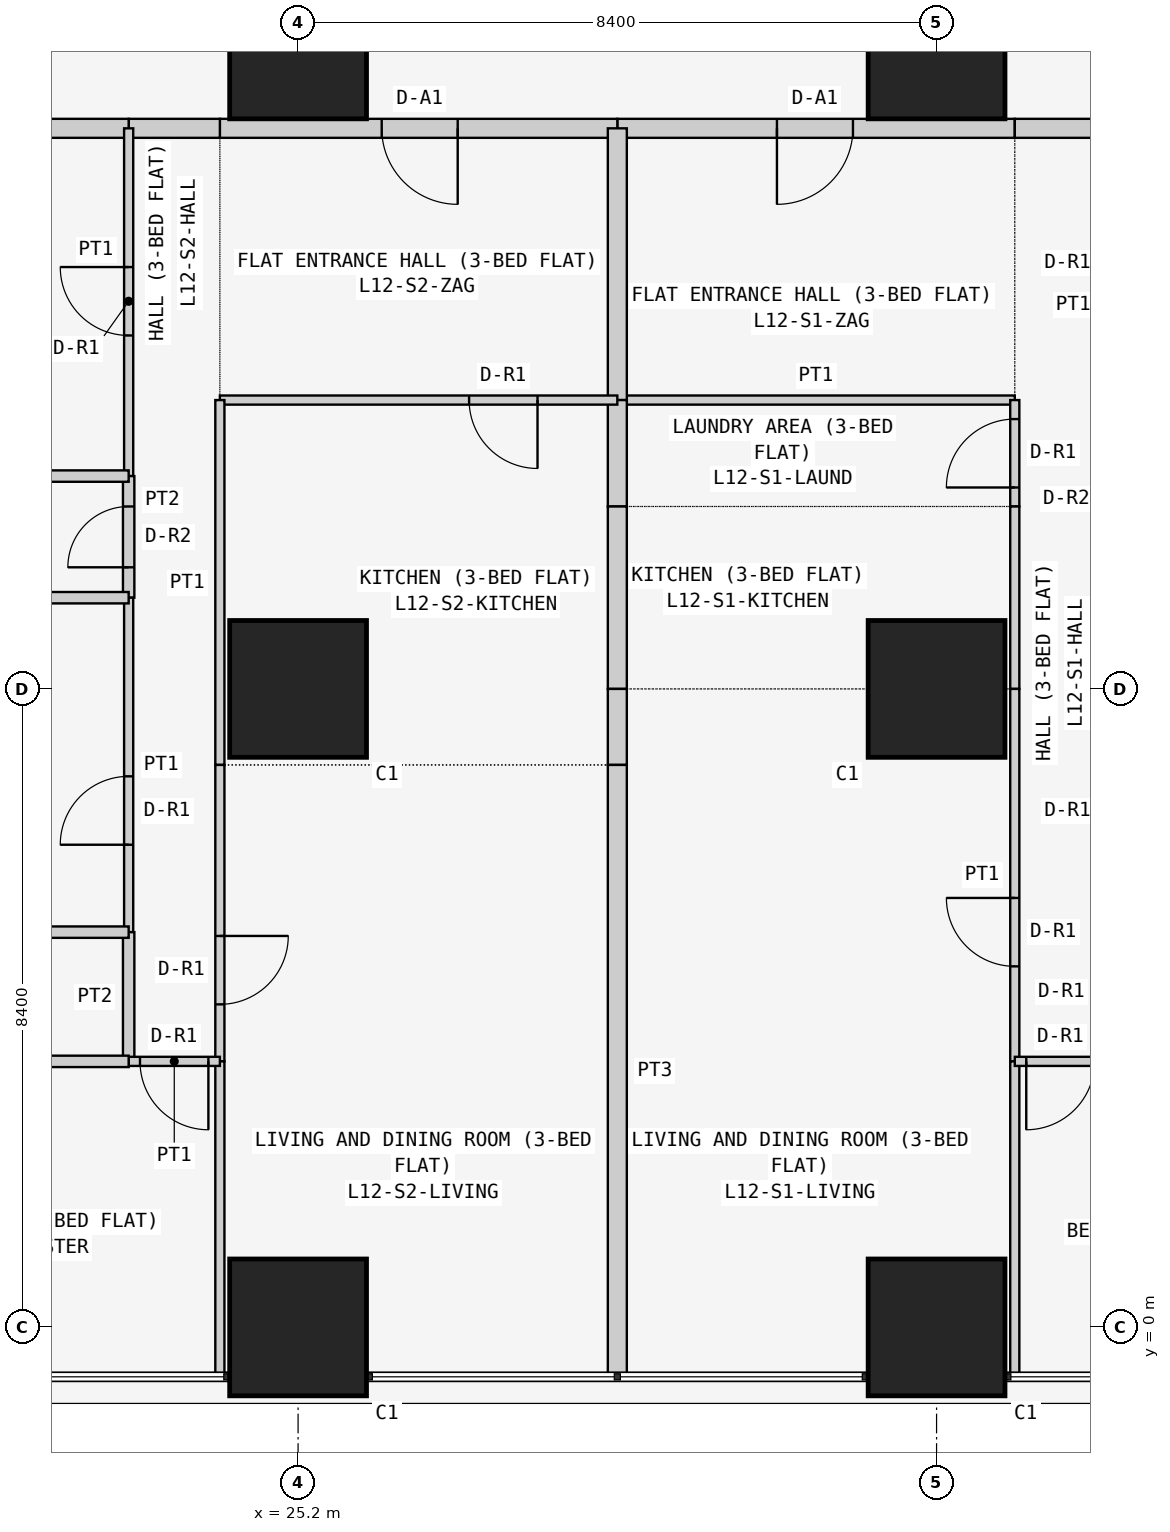
"""IFC4 building model, lengths in metres.
Left out: names, types, materials, properties, quantities, classifications, styles, units other than length and angle.
Written with IfcOpenShell. Run it as: python <this file> out.ifc"""

import sys

from ifc_helpers import new_model, si_unit, direction, frame, frame_2d, origin, origin_2d, place, context, subcontext, project, spatial, rectangle, extrude, element, fill, save


model = new_model("IFC4")
c1 = context("Model", 3, precision=1e-05, world=origin(), true_north=direction((0.0, 1.0)))
c2 = subcontext(c1, "Body", "Model", "MODEL_VIEW")
j1 = project(units=[si_unit("LENGTHUNIT", "METRE"), si_unit("PLANEANGLEUNIT", "RADIAN")], contexts=[c1])
p1 = place(None, origin())
s1 = spatial("IfcSite", under=j1, at=p1, CompositionType="ELEMENT")
p2 = place(p1, origin())
s2 = spatial("IfcBuilding", under=s1, at=p2, CompositionType="ELEMENT")
p3 = place(p2, frame((0.0, 0.0, 52.5)))
s3 = spatial("IfcBuildingStorey", under=s2, at=p3, CompositionType="ELEMENT", Elevation=52.5)
for number, where, z_axis, x_axis in (
    (1, (25.2, 0.0, 0.0), (0.0, 0.0, 1.0), (1.0, 0.0, 0.0)),
    (2, (25.2, 8.4, 0.0), (0.0, 0.0, 1.0), (1.0, 0.0, 0.0)),
    (3, (25.2, 16.8, 0.0), (0.0, 0.0, 1.0), (1.0, 0.0, 0.0)),
    (4, (33.6, 0.0, 0.0), (0.0, 0.0, 1.0), (1.0, 0.0, 0.0)),
    (5, (33.6, 8.4, 0.0), (0.0, 0.0, 1.0), (1.0, 0.0, 0.0)),
    (6, (33.6, 16.8, 0.0), (0.0, 0.0, 1.0), (1.0, 0.0, 0.0)),
):
    element("IfcColumn", number, at=place(p3, frame(where, z_axis=z_axis, x_axis=x_axis)), inside=s3, PredefinedType="COLUMN", context=c2, shape_type="SweptSolid", body=[
        extrude(rectangle(XDim=1.8, YDim=1.8, at=origin_2d()), origin(), (0.0, 0.0, 1.0), 3.6),
    ])
p4 = place(p3, frame((34.629, 15.775, 0.0), z_axis=(0.0, 0.0, 1.0), x_axis=(-1.0, 0.0, 0.0)))
e7 = element("IfcWall", 7, at=p4, inside=s3, PredefinedType="PARTITIONING", context=c2, shape_type="SweptSolid", body=[
    extrude(rectangle(XDim=5.229, YDim=0.25, at=frame_2d((2.615, 0.0))), origin(), (0.0, 0.0, 1.0), 3.45),
])
p5 = place(p4, frame((2.129, 0.0, 0.0)))
e8 = element("IfcOpeningElement", 8, at=p5, cuts=e7, PredefinedType="OPENING", context=c2, shape_type="SweptSolid", body=[
    extrude(rectangle(XDim=1.0, YDim=2.1, at=frame_2d((0.5, 1.05))), frame((0.0, 0.135, 0.0), z_axis=(0.0, -1.0, 0.0), x_axis=(1.0, 0.0, 0.0)), (0.0, 0.0, 1.0), 0.27),
])
p6 = place(p3, frame((35.829, 15.775, 0.0), z_axis=(0.0, 0.0, 1.0), x_axis=(-1.0, 0.0, 0.0)))
e9 = element("IfcWall", 9, at=p6, inside=s3, PredefinedType="PARTITIONING", context=c2, shape_type="SweptSolid", body=[
    extrude(rectangle(XDim=1.2, YDim=0.25, at=frame_2d((0.6, 0.0))), origin(), (0.0, 0.0, 1.0), 3.45),
])
p7 = place(p3, frame((29.4, 15.775, 0.0), z_axis=(0.0, 0.0, 1.0), x_axis=(-1.0, 0.0, 0.0)))
e10 = element("IfcWall", 10, at=p7, inside=s3, PredefinedType="PARTITIONING", context=c2, shape_type="SweptSolid", body=[
    extrude(rectangle(XDim=5.229, YDim=0.25, at=frame_2d((2.615, 0.0))), origin(), (0.0, 0.0, 1.0), 3.45),
])
p8 = place(p7, frame((2.1, 0.0, 0.0)))
e11 = element("IfcOpeningElement", 11, at=p8, cuts=e10, PredefinedType="OPENING", context=c2, shape_type="SweptSolid", body=[
    extrude(rectangle(XDim=1.0, YDim=2.1, at=frame_2d((0.5, 1.05))), frame((0.0, 0.135, 0.0), z_axis=(0.0, -1.0, 0.0), x_axis=(1.0, 0.0, 0.0)), (0.0, 0.0, 1.0), 0.27),
])
p9 = place(p3, frame((24.171, 15.775, 0.0), z_axis=(0.0, 0.0, 1.0), x_axis=(-1.0, 0.0, 0.0)))
e12 = element("IfcWall", 12, at=p9, inside=s3, PredefinedType="PARTITIONING", context=c2, shape_type="SweptSolid", body=[
    extrude(rectangle(XDim=1.2, YDim=0.25, at=frame_2d((0.6, 0.0))), origin(), (0.0, 0.0, 1.0), 3.45),
])
p10 = place(p3, frame((22.971, 15.775, 0.0), z_axis=(0.0, 0.0, 1.0), x_axis=(-1.0, 0.0, 0.0)))
e13 = element("IfcWall", 13, at=p10, inside=s3, PredefinedType="PARTITIONING", context=c2, shape_type="SweptSolid", body=[
    extrude(rectangle(XDim=6.871, YDim=0.25, at=frame_2d((3.436, 0.0))), origin(), (0.0, 0.0, 1.0), 3.45),
])
p11 = place(p3, frame((29.4, 12.2, 0.0), z_axis=(0.0, 0.0, 1.0), x_axis=(1.0, 0.0, 0.0)))
e14 = element("IfcWall", 14, at=p11, inside=s3, PredefinedType="PARTITIONING", context=c2, shape_type="SweptSolid", body=[
    extrude(rectangle(XDim=5.229, YDim=0.12, at=frame_2d((2.615, 0.0))), origin(), (0.0, 0.0, 1.0), 3.45),
])
p12 = place(p3, frame((29.4, 15.775, 0.0), z_axis=(0.0, 0.0, 1.0), x_axis=(0.0, -1.0, 0.0)))
e15 = element("IfcWall", 15, at=p12, inside=s3, PredefinedType="PARTITIONING", context=c2, shape_type="SweptSolid", body=[
    extrude(rectangle(XDim=3.575, YDim=0.25, at=frame_2d((1.788, 0.0))), origin(), (0.0, 0.0, 1.0), 2.848),
])
p13 = place(p3, frame((34.629, 10.8, 0.0), z_axis=(0.0, 0.0, 1.0), x_axis=(0.0, 1.0, 0.0)))
e16 = element("IfcWall", 16, at=p13, inside=s3, PredefinedType="PARTITIONING", context=c2, shape_type="SweptSolid", body=[
    extrude(rectangle(XDim=1.4, YDim=0.12, at=frame_2d((0.7, 0.0))), origin(), (0.0, 0.0, 1.0), 3.45),
])
p14 = place(p13, frame((0.25, 0.0, 0.0)))
e17 = element("IfcOpeningElement", 17, at=p14, cuts=e16, PredefinedType="OPENING", context=c2, shape_type="SweptSolid", body=[
    extrude(rectangle(XDim=0.9, YDim=2.1, at=frame_2d((0.45, 1.05))), frame((0.0, 0.07, 0.0), z_axis=(0.0, -1.0, 0.0), x_axis=(1.0, 0.0, 0.0)), (0.0, 0.0, 1.0), 0.14),
])
p15 = place(p3, frame((29.4, 12.2, 0.0), z_axis=(0.0, 0.0, 1.0), x_axis=(0.0, -1.0, 0.0)))
e18 = element("IfcWall", 18, at=p15, inside=s3, PredefinedType="PARTITIONING", context=c2, shape_type="SweptSolid", body=[
    extrude(rectangle(XDim=1.4, YDim=0.25, at=frame_2d((0.7, 0.0))), origin(), (0.0, 0.0, 1.0), 2.848),
])
p16 = place(p3, frame((34.629, 8.4, 0.0), z_axis=(0.0, 0.0, 1.0), x_axis=(0.0, 1.0, 0.0)))
e19 = element("IfcWall", 19, at=p16, inside=s3, PredefinedType="PARTITIONING", context=c2, shape_type="SweptSolid", body=[
    extrude(rectangle(XDim=2.4, YDim=0.12, at=frame_2d((1.2, 0.0))), origin(), (0.0, 0.0, 1.0), 3.45),
])
p17 = place(p3, frame((29.4, 10.8, 0.0), z_axis=(0.0, 0.0, 1.0), x_axis=(0.0, -1.0, 0.0)))
e20 = element("IfcWall", 20, at=p17, inside=s3, PredefinedType="PARTITIONING", context=c2, shape_type="SweptSolid", body=[
    extrude(rectangle(XDim=2.4, YDim=0.25, at=frame_2d((1.2, 0.0))), origin(), (0.0, 0.0, 1.0), 2.848),
])
p18 = place(p3, frame((34.629, 3.5, 0.0), z_axis=(0.0, 0.0, 1.0), x_axis=(0.0, 1.0, 0.0)))
e21 = element("IfcWall", 21, at=p18, inside=s3, PredefinedType="PARTITIONING", context=c2, shape_type="SweptSolid", body=[
    extrude(rectangle(XDim=4.9, YDim=0.12, at=frame_2d((2.45, 0.0))), origin(), (0.0, 0.0, 1.0), 3.45),
])
p19 = place(p18, frame((1.25, 0.0, 0.0)))
e22 = element("IfcOpeningElement", 22, at=p19, cuts=e21, PredefinedType="OPENING", context=c2, shape_type="SweptSolid", body=[
    extrude(rectangle(XDim=0.9, YDim=2.1, at=frame_2d((0.45, 1.05))), frame((0.0, 0.07, 0.0), z_axis=(0.0, -1.0, 0.0), x_axis=(1.0, 0.0, 0.0)), (0.0, 0.0, 1.0), 0.14),
])
p20 = place(p3, frame((34.629, -0.65, 0.0), z_axis=(0.0, 0.0, 1.0), x_axis=(0.0, 1.0, 0.0)))
e23 = element("IfcWall", 23, at=p20, inside=s3, PredefinedType="PARTITIONING", context=c2, shape_type="SweptSolid", body=[
    extrude(rectangle(XDim=4.15, YDim=0.12, at=frame_2d((2.075, 0.0))), origin(), (0.0, 0.0, 1.0), 3.45),
])
p21 = place(p3, frame((29.4, 8.4, 0.0), z_axis=(0.0, 0.0, 1.0), x_axis=(0.0, -1.0, 0.0)))
e24 = element("IfcWall", 24, at=p21, inside=s3, PredefinedType="PARTITIONING", context=c2, shape_type="SweptSolid", body=[
    extrude(rectangle(XDim=1.0, YDim=0.25, at=frame_2d((0.5, 0.0))), origin(), (0.0, 0.0, 1.0), 2.848),
])
p22 = place(p3, frame((29.4, 7.4, 0.0), z_axis=(0.0, 0.0, 1.0), x_axis=(0.0, -1.0, 0.0)))
e25 = element("IfcWall", 25, at=p22, inside=s3, PredefinedType="PARTITIONING", context=c2, shape_type="SweptSolid", body=[
    extrude(rectangle(XDim=8.05, YDim=0.25, at=frame_2d((4.025, 0.0))), origin(), (0.0, 0.0, 1.0), 2.848),
])
p23 = place(p3, frame((34.629, 3.5, 0.0), z_axis=(0.0, 0.0, 1.0), x_axis=(1.0, 0.0, 0.0)))
e26 = element("IfcWall", 26, at=p23, inside=s3, PredefinedType="PARTITIONING", context=c2, shape_type="SweptSolid", body=[
    extrude(rectangle(XDim=1.2, YDim=0.12, at=frame_2d((0.6, 0.0))), origin(), (0.0, 0.0, 1.0), 3.45),
])
p24 = place(p23, frame((0.151, 0.0, 0.0)))
e27 = element("IfcOpeningElement", 27, at=p24, cuts=e26, PredefinedType="OPENING", context=c2, shape_type="SweptSolid", body=[
    extrude(rectangle(XDim=0.9, YDim=2.1, at=frame_2d((0.45, 1.05))), frame((0.0, 0.07, 0.0), z_axis=(0.0, -1.0, 0.0), x_axis=(1.0, 0.0, 0.0)), (0.0, 0.0, 1.0), 0.14),
])
p25 = place(p3, frame((29.4, 12.2, 0.0), z_axis=(0.0, 0.0, 1.0), x_axis=(-1.0, 0.0, 0.0)))
e28 = element("IfcWall", 28, at=p25, inside=s3, PredefinedType="PARTITIONING", context=c2, shape_type="SweptSolid", body=[
    extrude(rectangle(XDim=5.229, YDim=0.12, at=frame_2d((2.615, 0.0))), origin(), (0.0, 0.0, 1.0), 3.45),
])
p26 = place(p25, frame((1.05, 0.0, 0.0)))
e29 = element("IfcOpeningElement", 29, at=p26, cuts=e28, PredefinedType="OPENING", context=c2, shape_type="SweptSolid", body=[
    extrude(rectangle(XDim=0.9, YDim=2.1, at=frame_2d((0.45, 1.05))), frame((0.0, 0.07, 0.0), z_axis=(0.0, -1.0, 0.0), x_axis=(1.0, 0.0, 0.0)), (0.0, 0.0, 1.0), 0.14),
])
p27 = place(p3, frame((24.171, 7.4, 0.0), z_axis=(0.0, 0.0, 1.0), x_axis=(0.0, 1.0, 0.0)))
e30 = element("IfcWall", 30, at=p27, inside=s3, PredefinedType="PARTITIONING", context=c2, shape_type="SweptSolid", body=[
    extrude(rectangle(XDim=4.8, YDim=0.12, at=frame_2d((2.4, 0.0))), origin(), (0.0, 0.0, 1.0), 3.45),
])
p28 = place(p3, frame((24.171, 3.5, 0.0), z_axis=(0.0, 0.0, 1.0), x_axis=(0.0, 1.0, 0.0)))
e31 = element("IfcWall", 31, at=p28, inside=s3, PredefinedType="PARTITIONING", context=c2, shape_type="SweptSolid", body=[
    extrude(rectangle(XDim=3.9, YDim=0.12, at=frame_2d((1.95, 0.0))), origin(), (0.0, 0.0, 1.0), 3.45),
])
p29 = place(p28, frame((0.75, 0.0, 0.0)))
e32 = element("IfcOpeningElement", 32, at=p29, cuts=e31, PredefinedType="OPENING", context=c2, shape_type="SweptSolid", body=[
    extrude(rectangle(XDim=0.9, YDim=2.1, at=frame_2d((0.45, 1.05))), frame((0.0, 0.07, 0.0), z_axis=(0.0, -1.0, 0.0), x_axis=(1.0, 0.0, 0.0)), (0.0, 0.0, 1.0), 0.14),
])
p30 = place(p3, frame((24.171, -0.65, 0.0), z_axis=(0.0, 0.0, 1.0), x_axis=(0.0, 1.0, 0.0)))
e33 = element("IfcWall", 33, at=p30, inside=s3, PredefinedType="PARTITIONING", context=c2, shape_type="SweptSolid", body=[
    extrude(rectangle(XDim=4.15, YDim=0.12, at=frame_2d((2.075, 0.0))), origin(), (0.0, 0.0, 1.0), 3.45),
])
p31 = place(p3, frame((22.971, 11.2, 0.0), z_axis=(0.0, 0.0, 1.0), x_axis=(0.0, 1.0, 0.0)))
e34 = element("IfcWall", 34, at=p31, inside=s3, PredefinedType="PARTITIONING", context=c2, shape_type="SweptSolid", body=[
    extrude(rectangle(XDim=4.575, YDim=0.12, at=frame_2d((2.288, 0.0))), origin(), (0.0, 0.0, 1.0), 3.45),
])
p32 = place(p31, frame((1.85, 0.0, 0.0)))
e35 = element("IfcOpeningElement", 35, at=p32, cuts=e34, PredefinedType="OPENING", context=c2, shape_type="SweptSolid", body=[
    extrude(rectangle(XDim=0.9, YDim=2.1, at=frame_2d((0.45, 1.05))), frame((0.0, 0.07, 0.0), z_axis=(0.0, -1.0, 0.0), x_axis=(1.0, 0.0, 0.0)), (0.0, 0.0, 1.0), 0.14),
])
p33 = place(p3, frame((22.971, 9.6, 0.0), z_axis=(0.0, 0.0, 1.0), x_axis=(0.0, 1.0, 0.0)))
e36 = element("IfcWall", 36, at=p33, inside=s3, PredefinedType="PARTITIONING", context=c2, shape_type="SweptSolid", body=[
    extrude(rectangle(XDim=1.6, YDim=0.15, at=frame_2d((0.8, 0.0))), origin(), (0.0, 0.0, 1.0), 3.45),
])
p34 = place(p33, frame((0.4, 0.0, 0.0)))
e37 = element("IfcOpeningElement", 37, at=p34, cuts=e36, PredefinedType="OPENING", context=c2, shape_type="SweptSolid", body=[
    extrude(rectangle(XDim=0.8, YDim=2.1, at=frame_2d((0.4, 1.05))), frame((0.0, 0.085, 0.0), z_axis=(0.0, -1.0, 0.0), x_axis=(1.0, 0.0, 0.0)), (0.0, 0.0, 1.0), 0.17),
])
p35 = place(p3, frame((22.971, 5.2, 0.0), z_axis=(0.0, 0.0, 1.0), x_axis=(0.0, 1.0, 0.0)))
e38 = element("IfcWall", 38, at=p35, inside=s3, PredefinedType="PARTITIONING", context=c2, shape_type="SweptSolid", body=[
    extrude(rectangle(XDim=4.4, YDim=0.12, at=frame_2d((2.2, 0.0))), origin(), (0.0, 0.0, 1.0), 3.45),
])
p36 = place(p35, frame((1.15, 0.0, 0.0)))
e39 = element("IfcOpeningElement", 39, at=p36, cuts=e38, PredefinedType="OPENING", context=c2, shape_type="SweptSolid", body=[
    extrude(rectangle(XDim=0.9, YDim=2.1, at=frame_2d((0.45, 1.05))), frame((0.0, 0.07, 0.0), z_axis=(0.0, -1.0, 0.0), x_axis=(1.0, 0.0, 0.0)), (0.0, 0.0, 1.0), 0.14),
])
p37 = place(p3, frame((22.971, 3.5, 0.0), z_axis=(0.0, 0.0, 1.0), x_axis=(0.0, 1.0, 0.0)))
e40 = element("IfcWall", 40, at=p37, inside=s3, PredefinedType="PARTITIONING", context=c2, shape_type="SweptSolid", body=[
    extrude(rectangle(XDim=1.7, YDim=0.15, at=frame_2d((0.85, 0.0))), origin(), (0.0, 0.0, 1.0), 3.45),
])
p38 = place(p3, frame((24.171, 3.5, 0.0), z_axis=(0.0, 0.0, 1.0), x_axis=(-1.0, 0.0, 0.0)))
e41 = element("IfcWall", 41, at=p38, inside=s3, PredefinedType="PARTITIONING", context=c2, shape_type="SweptSolid", body=[
    extrude(rectangle(XDim=1.2, YDim=0.12, at=frame_2d((0.6, 0.0))), origin(), (0.0, 0.0, 1.0), 3.45),
])
p39 = place(p38, frame((0.151, 0.0, 0.0)))
e42 = element("IfcOpeningElement", 42, at=p39, cuts=e41, PredefinedType="OPENING", context=c2, shape_type="SweptSolid", body=[
    extrude(rectangle(XDim=0.9, YDim=2.1, at=frame_2d((0.45, 1.05))), frame((0.0, 0.07, 0.0), z_axis=(0.0, -1.0, 0.0), x_axis=(1.0, 0.0, 0.0)), (0.0, 0.0, 1.0), 0.14),
])
for number, where, z_axis, x_axis in (
    (43, (22.971, 11.2, 0.0), (0.0, 0.0, 1.0), (-1.0, 0.0, 0.0)),
    (44, (22.971, 9.6, 0.0), (0.0, 0.0, 1.0), (-1.0, 0.0, 0.0)),
    (45, (22.971, 5.2, 0.0), (0.0, 0.0, 1.0), (-1.0, 0.0, 0.0)),
):
    element("IfcWall", number, at=place(p3, frame(where, z_axis=z_axis, x_axis=x_axis)), inside=s3, PredefinedType="PARTITIONING", context=c2, shape_type="SweptSolid", body=[
        extrude(rectangle(XDim=6.871, YDim=0.15, at=frame_2d((3.436, 0.0))), origin(), (0.0, 0.0, 1.0), 3.45),
    ])
p40 = place(p3, frame((22.971, 3.5, 0.0), z_axis=(0.0, 0.0, 1.0), x_axis=(-1.0, 0.0, 0.0)))
e46 = element("IfcWall", 46, at=p40, inside=s3, PredefinedType="PARTITIONING", context=c2, shape_type="SweptSolid", body=[
    extrude(rectangle(XDim=6.871, YDim=0.15, at=frame_2d((3.436, 0.0))), origin(), (0.0, 0.0, 1.0), 3.45),
])
p41 = place(p40, frame((3.171, 0.0, 0.0)))
e47 = element("IfcOpeningElement", 47, at=p41, cuts=e46, PredefinedType="OPENING", context=c2, shape_type="SweptSolid", body=[
    extrude(rectangle(XDim=0.8, YDim=2.1, at=frame_2d((0.4, 1.05))), frame((0.0, 0.085, 0.0), z_axis=(0.0, -1.0, 0.0), x_axis=(1.0, 0.0, 0.0)), (0.0, 0.0, 1.0), 0.17),
])
p42 = place(p5, origin())
e48 = element("IfcDoor", 48, at=p42, inside=s3, OperationType="SINGLE_SWING_RIGHT", PredefinedType="DOOR", context=c2, shape_type="SweptSolid", body=[
    extrude(rectangle(XDim=1.0, YDim=2.1, at=frame_2d((0.5, 1.05))), frame((0.0, 0.025, 0.0), z_axis=(0.0, -1.0, 0.0), x_axis=(1.0, 0.0, 0.0)), (0.0, 0.0, 1.0), 0.05),
])
fill(e8, e48)
p43 = place(p14, origin())
e49 = element("IfcDoor", 49, at=p43, inside=s3, OperationType="SINGLE_SWING_LEFT", PredefinedType="DOOR", context=c2, shape_type="SweptSolid", body=[
    extrude(rectangle(XDim=0.9, YDim=2.1, at=frame_2d((0.45, 1.05))), frame((0.0, 0.025, 0.0), z_axis=(0.0, -1.0, 0.0), x_axis=(1.0, 0.0, 0.0)), (0.0, 0.0, 1.0), 0.05),
])
fill(e17, e49)
p44 = place(p19, origin())
e50 = element("IfcDoor", 50, at=p44, inside=s3, OperationType="SINGLE_SWING_RIGHT", PredefinedType="DOOR", context=c2, shape_type="SweptSolid", body=[
    extrude(rectangle(XDim=0.9, YDim=2.1, at=frame_2d((0.45, 1.05))), frame((0.0, 0.025, 0.0), z_axis=(0.0, -1.0, 0.0), x_axis=(1.0, 0.0, 0.0)), (0.0, 0.0, 1.0), 0.05),
])
fill(e22, e50)
p45 = place(p24, frame((0.9, 0.0, 0.0), z_axis=(0.0, 0.0, 1.0), x_axis=(-1.0, 0.0, 0.0)))
e51 = element("IfcDoor", 51, at=p45, inside=s3, OperationType="SINGLE_SWING_RIGHT", PredefinedType="DOOR", context=c2, shape_type="SweptSolid", body=[
    extrude(rectangle(XDim=0.9, YDim=2.1, at=frame_2d((0.45, 1.05))), frame((0.0, 0.025, 0.0), z_axis=(0.0, -1.0, 0.0), x_axis=(1.0, 0.0, 0.0)), (0.0, 0.0, 1.0), 0.05),
])
fill(e27, e51)
p46 = place(p8, origin())
e52 = element("IfcDoor", 52, at=p46, inside=s3, OperationType="SINGLE_SWING_LEFT", PredefinedType="DOOR", context=c2, shape_type="SweptSolid", body=[
    extrude(rectangle(XDim=1.0, YDim=2.1, at=frame_2d((0.5, 1.05))), frame((0.0, 0.025, 0.0), z_axis=(0.0, -1.0, 0.0), x_axis=(1.0, 0.0, 0.0)), (0.0, 0.0, 1.0), 0.05),
])
fill(e11, e52)
p47 = place(p26, origin())
e53 = element("IfcDoor", 53, at=p47, inside=s3, OperationType="SINGLE_SWING_LEFT", PredefinedType="DOOR", context=c2, shape_type="SweptSolid", body=[
    extrude(rectangle(XDim=0.9, YDim=2.1, at=frame_2d((0.45, 1.05))), frame((0.0, 0.025, 0.0), z_axis=(0.0, -1.0, 0.0), x_axis=(1.0, 0.0, 0.0)), (0.0, 0.0, 1.0), 0.05),
])
fill(e29, e53)
p48 = place(p29, frame((0.9, 0.0, 0.0), z_axis=(0.0, 0.0, 1.0), x_axis=(-1.0, 0.0, 0.0)))
e54 = element("IfcDoor", 54, at=p48, inside=s3, OperationType="SINGLE_SWING_LEFT", PredefinedType="DOOR", context=c2, shape_type="SweptSolid", body=[
    extrude(rectangle(XDim=0.9, YDim=2.1, at=frame_2d((0.45, 1.05))), frame((0.0, 0.025, 0.0), z_axis=(0.0, -1.0, 0.0), x_axis=(1.0, 0.0, 0.0)), (0.0, 0.0, 1.0), 0.05),
])
fill(e32, e54)
p49 = place(p32, origin())
e55 = element("IfcDoor", 55, at=p49, inside=s3, OperationType="SINGLE_SWING_RIGHT", PredefinedType="DOOR", context=c2, shape_type="SweptSolid", body=[
    extrude(rectangle(XDim=0.9, YDim=2.1, at=frame_2d((0.45, 1.05))), frame((0.0, 0.025, 0.0), z_axis=(0.0, -1.0, 0.0), x_axis=(1.0, 0.0, 0.0)), (0.0, 0.0, 1.0), 0.05),
])
fill(e35, e55)
p50 = place(p34, origin())
e56 = element("IfcDoor", 56, at=p50, inside=s3, OperationType="SINGLE_SWING_LEFT", PredefinedType="DOOR", context=c2, shape_type="SweptSolid", body=[
    extrude(rectangle(XDim=0.8, YDim=2.1, at=frame_2d((0.4, 1.05))), frame((0.0, 0.025, 0.0), z_axis=(0.0, -1.0, 0.0), x_axis=(1.0, 0.0, 0.0)), (0.0, 0.0, 1.0), 0.05),
])
fill(e37, e56)
p51 = place(p36, origin())
e57 = element("IfcDoor", 57, at=p51, inside=s3, OperationType="SINGLE_SWING_LEFT", PredefinedType="DOOR", context=c2, shape_type="SweptSolid", body=[
    extrude(rectangle(XDim=0.9, YDim=2.1, at=frame_2d((0.45, 1.05))), frame((0.0, 0.025, 0.0), z_axis=(0.0, -1.0, 0.0), x_axis=(1.0, 0.0, 0.0)), (0.0, 0.0, 1.0), 0.05),
])
fill(e39, e57)
p52 = place(p39, origin())
e58 = element("IfcDoor", 58, at=p52, inside=s3, OperationType="SINGLE_SWING_LEFT", PredefinedType="DOOR", context=c2, shape_type="SweptSolid", body=[
    extrude(rectangle(XDim=0.9, YDim=2.1, at=frame_2d((0.45, 1.05))), frame((0.0, 0.025, 0.0), z_axis=(0.0, -1.0, 0.0), x_axis=(1.0, 0.0, 0.0)), (0.0, 0.0, 1.0), 0.05),
])
fill(e42, e58)
save(model, sys.argv[1])
